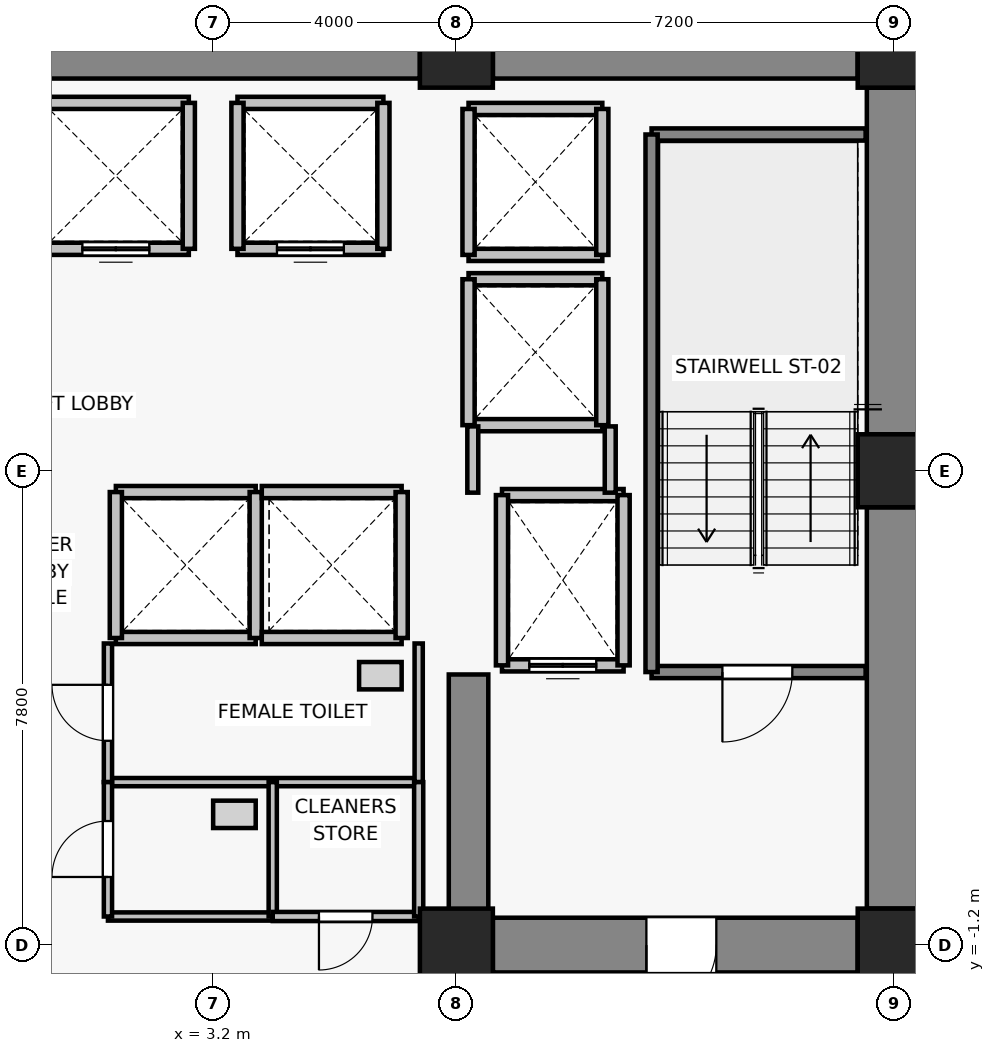
"""IFC4 building model, lengths in metres.
Left out: names, types, materials, properties, quantities, classifications, styles, units other than length and angle.
Written with IfcOpenShell. Run it as: python <this file> out.ifc"""

import sys

from ifc_helpers import new_model, si_unit, direction, frame, frame_2d, origin, origin_2d, place, context, subcontext, project, spatial, rectangle, extrude, source, transform, mapped, element, fill, save


model = new_model("IFC4")
c1 = context("Model", 3, precision=1e-05, world=origin(), true_north=direction((0.0, 1.0)))
c2 = subcontext(c1, "Body", "Model", "MODEL_VIEW")
j1 = project(units=[si_unit("LENGTHUNIT", "METRE"), si_unit("PLANEANGLEUNIT", "RADIAN")], contexts=[c1])
p1 = place(None, origin())
s1 = spatial("IfcSite", under=j1, at=p1, CompositionType="ELEMENT")
p2 = place(p1, origin())
s2 = spatial("IfcBuilding", under=s1, at=p2, CompositionType="ELEMENT")
p3 = place(p2, frame((0.0, 0.0, 37.3)))
s3 = spatial("IfcBuildingStorey", under=s2, at=p3, CompositionType="ELEMENT", Elevation=37.3)
for number, where, z_axis, x_axis in (
    (1, (7.2, -1.2, 0.0), (0.0, 0.0, 1.0), (1.0, 0.0, 0.0)),
    (2, (14.4, -1.2, 0.0), (0.0, 0.0, 1.0), (1.0, 0.0, 0.0)),
    (3, (14.4, 6.6, 0.0), (0.0, 0.0, 1.0), (1.0, 0.0, 0.0)),
    (4, (7.2, 13.5, 0.0), (0.0, 0.0, 1.0), (1.0, 0.0, 0.0)),
    (5, (14.4, 13.5, 0.0), (0.0, 0.0, 1.0), (1.0, 0.0, 0.0)),
):
    element("IfcColumn", number, at=place(p3, frame(where, z_axis=z_axis, x_axis=x_axis)), inside=s3, PredefinedType="COLUMN", context=c2, shape_type="SweptSolid", body=[
        extrude(rectangle(XDim=1.2, YDim=1.2, at=origin_2d()), origin(), (0.0, 0.0, 1.0), 3.3),
    ])
p4 = place(p3, frame((-6.6, 13.5, 0.0), z_axis=(0.0, 0.0, 1.0), x_axis=(1.0, 0.0, 0.0)))
e6 = element("IfcWall", 6, at=p4, inside=s3, PredefinedType="SHEAR", context=c2, shape_type="SweptSolid", body=[
    extrude(rectangle(XDim=13.2, YDim=0.9, at=frame_2d((6.6, 0.0))), origin(), (0.0, 0.0, 1.0), 3.075),
])
p5 = place(p3, frame((7.8, 13.5, 0.0), z_axis=(0.0, 0.0, 1.0), x_axis=(1.0, 0.0, 0.0)))
e7 = element("IfcWall", 7, at=p5, inside=s3, PredefinedType="SHEAR", context=c2, shape_type="SweptSolid", body=[
    extrude(rectangle(XDim=6.0, YDim=0.9, at=frame_2d((3.0, 0.0))), origin(), (0.0, 0.0, 1.0), 3.075),
])
p6 = place(p3, frame((14.4, -0.6, 0.0), z_axis=(0.0, 0.0, 1.0), x_axis=(0.0, 1.0, 0.0)))
e8 = element("IfcWall", 8, at=p6, inside=s3, PredefinedType="SHEAR", context=c2, shape_type="SweptSolid", body=[
    extrude(rectangle(XDim=6.6, YDim=0.9, at=frame_2d((3.3, 0.0))), origin(), (0.0, 0.0, 1.0), 3.075),
])
p7 = place(p3, frame((14.4, 7.2, 0.0), z_axis=(0.0, 0.0, 1.0), x_axis=(0.0, 1.0, 0.0)))
e9 = element("IfcWall", 9, at=p7, inside=s3, PredefinedType="SHEAR", context=c2, shape_type="SweptSolid", body=[
    extrude(rectangle(XDim=5.7, YDim=0.9, at=frame_2d((2.85, 0.0))), origin(), (0.0, 0.0, 1.0), 3.075),
])
p8 = place(p3, frame((13.8, -1.2, 0.0), z_axis=(0.0, 0.0, 1.0), x_axis=(-1.0, 0.0, 0.0)))
e10 = element("IfcWall", 10, at=p8, inside=s3, PredefinedType="SHEAR", context=c2, shape_type="SweptSolid", body=[
    extrude(rectangle(XDim=6.0, YDim=0.9, at=frame_2d((3.0, 0.0))), origin(), (0.0, 0.0, 1.0), 3.075),
])
p9 = place(p8, frame((2.325, 0.0, 0.0)))
e11 = element("IfcOpeningElement", 11, at=p9, cuts=e10, PredefinedType="OPENING", context=c2, shape_type="SweptSolid", body=[
    extrude(rectangle(XDim=1.15, YDim=2.15, at=frame_2d((0.575, 1.075))), frame((0.0, 0.46, 0.0), z_axis=(0.0, -1.0, 0.0), x_axis=(1.0, 0.0, 0.0)), (0.0, 0.0, 1.0), 0.92),
])
p10 = place(p3, frame((7.4, -0.75, 0.0), z_axis=(0.0, 0.0, 1.0), x_axis=(0.0, 1.0, 0.0)))
e12 = element("IfcWall", 12, at=p10, inside=s3, PredefinedType="SHEAR", context=c2, shape_type="SweptSolid", body=[
    extrude(rectangle(XDim=4.0, YDim=0.65, at=frame_2d((2.0, 0.0))), origin(), (0.0, 0.0, 1.0), 3.075),
])
p11 = place(p3, frame((9.95, 3.4, 0.0), z_axis=(0.0, 0.0, 1.0), x_axis=(-1.0, 0.0, 0.0)))
e13 = element("IfcWall", 13, at=p11, inside=s3, PredefinedType="SOLIDWALL", context=c2, shape_type="SweptSolid", body=[
    extrude(rectangle(XDim=2.0, YDim=0.2, at=frame_2d((1.0, 0.0))), origin(), (0.0, 0.0, 1.0), 3.075),
])
p12 = place(p11, frame((0.45, 0.0, 0.0)))
e14 = element("IfcOpeningElement", 14, at=p12, cuts=e13, PredefinedType="OPENING", context=c2, shape_type="SweptSolid", body=[
    extrude(rectangle(XDim=1.1, YDim=2.2, at=frame_2d((0.55, 1.1))), frame((0.0, 0.11, 0.0), z_axis=(0.0, -1.0, 0.0), x_axis=(1.0, 0.0, 0.0)), (0.0, 0.0, 1.0), 0.22),
])
p13 = place(p3, frame((7.95, 6.2, 0.0), z_axis=(0.0, 0.0, 1.0), x_axis=(1.0, 0.0, 0.0)))
e15 = element("IfcWall", 15, at=p13, inside=s3, PredefinedType="SOLIDWALL", context=c2, shape_type="SweptSolid", body=[
    extrude(rectangle(XDim=2.0, YDim=0.2, at=frame_2d((1.0, 0.0))), origin(), (0.0, 0.0, 1.0), 3.075),
])
for number, where, z_axis, x_axis in (
    (16, (7.95, 3.4, 0.0), (0.0, 0.0, 1.0), (0.0, 1.0, 0.0)),
    (17, (9.95, 6.2, 0.0), (0.0, 0.0, 1.0), (0.0, -1.0, 0.0)),
):
    element("IfcWall", number, at=place(p3, frame(where, z_axis=z_axis, x_axis=x_axis)), inside=s3, PredefinedType="SOLIDWALL", context=c2, shape_type="SweptSolid", body=[
        extrude(rectangle(XDim=2.8, YDim=0.2, at=frame_2d((1.4, 0.0))), origin(), (0.0, 0.0, 1.0), 3.075),
    ])
p14 = place(p3, frame((2.8, 10.25, 0.0), z_axis=(0.0, 0.0, 1.0), x_axis=(-1.0, 0.0, 0.0)))
e18 = element("IfcWall", 18, at=p14, inside=s3, PredefinedType="SOLIDWALL", context=c2, shape_type="SweptSolid", body=[
    extrude(rectangle(XDim=2.4, YDim=0.2, at=frame_2d((1.2, 0.0))), origin(), (0.0, 0.0, 1.0), 3.075),
])
p15 = place(p14, frame((0.65, 0.0, 0.0)))
e19 = element("IfcOpeningElement", 19, at=p15, cuts=e18, PredefinedType="OPENING", context=c2, shape_type="SweptSolid", body=[
    extrude(rectangle(XDim=1.1, YDim=2.2, at=frame_2d((0.55, 1.1))), frame((0.0, 0.11, 0.0), z_axis=(0.0, -1.0, 0.0), x_axis=(1.0, 0.0, 0.0)), (0.0, 0.0, 1.0), 0.22),
])
p16 = place(p3, frame((0.4, 12.65, 0.0), z_axis=(0.0, 0.0, 1.0), x_axis=(1.0, 0.0, 0.0)))
e20 = element("IfcWall", 20, at=p16, inside=s3, PredefinedType="SOLIDWALL", context=c2, shape_type="SweptSolid", body=[
    extrude(rectangle(XDim=2.4, YDim=0.2, at=frame_2d((1.2, 0.0))), origin(), (0.0, 0.0, 1.0), 3.075),
])
p17 = place(p3, frame((2.8, 12.65, 0.0), z_axis=(0.0, 0.0, 1.0), x_axis=(0.0, -1.0, 0.0)))
e21 = element("IfcWall", 21, at=p17, inside=s3, PredefinedType="SOLIDWALL", context=c2, shape_type="SweptSolid", body=[
    extrude(rectangle(XDim=2.4, YDim=0.2, at=frame_2d((1.2, 0.0))), origin(), (0.0, 0.0, 1.0), 3.075),
])
p18 = place(p3, frame((6.0, 10.25, 0.0), z_axis=(0.0, 0.0, 1.0), x_axis=(-1.0, 0.0, 0.0)))
e22 = element("IfcWall", 22, at=p18, inside=s3, PredefinedType="SOLIDWALL", context=c2, shape_type="SweptSolid", body=[
    extrude(rectangle(XDim=2.4, YDim=0.2, at=frame_2d((1.2, 0.0))), origin(), (0.0, 0.0, 1.0), 3.075),
])
p19 = place(p18, frame((0.65, 0.0, 0.0)))
e23 = element("IfcOpeningElement", 23, at=p19, cuts=e22, PredefinedType="OPENING", context=c2, shape_type="SweptSolid", body=[
    extrude(rectangle(XDim=1.1, YDim=2.2, at=frame_2d((0.55, 1.1))), frame((0.0, 0.11, 0.0), z_axis=(0.0, -1.0, 0.0), x_axis=(1.0, 0.0, 0.0)), (0.0, 0.0, 1.0), 0.22),
])
for number, where, z_axis, x_axis in (
    (24, (3.6, 12.65, 0.0), (0.0, 0.0, 1.0), (1.0, 0.0, 0.0)),
    (25, (3.6, 10.25, 0.0), (0.0, 0.0, 1.0), (0.0, 1.0, 0.0)),
    (26, (6.0, 12.65, 0.0), (0.0, 0.0, 1.0), (0.0, -1.0, 0.0)),
):
    element("IfcWall", number, at=place(p3, frame(where, z_axis=z_axis, x_axis=x_axis)), inside=s3, PredefinedType="SOLIDWALL", context=c2, shape_type="SweptSolid", body=[
        extrude(rectangle(XDim=2.4, YDim=0.2, at=frame_2d((1.2, 0.0))), origin(), (0.0, 0.0, 1.0), 3.075),
    ])
for number, where, z_axis, x_axis in (
    (27, (3.9, 3.85, 0.0), (0.0, 0.0, 1.0), (-1.0, 0.0, 0.0)),
    (28, (1.6, 6.25, 0.0), (0.0, 0.0, 1.0), (1.0, 0.0, 0.0)),
):
    element("IfcWall", number, at=place(p3, frame(where, z_axis=z_axis, x_axis=x_axis)), inside=s3, PredefinedType="SOLIDWALL", context=c2, shape_type="SweptSolid", body=[
        extrude(rectangle(XDim=2.3, YDim=0.2, at=frame_2d((1.15, 0.0))), origin(), (0.0, 0.0, 1.0), 3.075),
    ])
for number, where, z_axis, x_axis in (
    (29, (1.6, 3.85, 0.0), (0.0, 0.0, 1.0), (0.0, 1.0, 0.0)),
    (30, (3.9, 6.25, 0.0), (0.0, 0.0, 1.0), (0.0, -1.0, 0.0)),
):
    element("IfcWall", number, at=place(p3, frame(where, z_axis=z_axis, x_axis=x_axis)), inside=s3, PredefinedType="SOLIDWALL", context=c2, shape_type="SweptSolid", body=[
        extrude(rectangle(XDim=2.4, YDim=0.2, at=frame_2d((1.2, 0.0))), origin(), (0.0, 0.0, 1.0), 3.075),
    ])
for number, where, z_axis, x_axis in (
    (31, (6.3, 3.85, 0.0), (0.0, 0.0, 1.0), (-1.0, 0.0, 0.0)),
    (32, (4.0, 6.25, 0.0), (0.0, 0.0, 1.0), (1.0, 0.0, 0.0)),
):
    element("IfcWall", number, at=place(p3, frame(where, z_axis=z_axis, x_axis=x_axis)), inside=s3, PredefinedType="SOLIDWALL", context=c2, shape_type="SweptSolid", body=[
        extrude(rectangle(XDim=2.3, YDim=0.2, at=frame_2d((1.15, 0.0))), origin(), (0.0, 0.0, 1.0), 3.075),
    ])
p20 = place(p3, frame((6.3, 6.25, 0.0), z_axis=(0.0, 0.0, 1.0), x_axis=(0.0, -1.0, 0.0)))
e33 = element("IfcWall", 33, at=p20, inside=s3, PredefinedType="SOLIDWALL", context=c2, shape_type="SweptSolid", body=[
    extrude(rectangle(XDim=2.4, YDim=0.2, at=frame_2d((1.2, 0.0))), origin(), (0.0, 0.0, 1.0), 3.075),
])
for number, where, z_axis, x_axis in (
    (34, (9.6, 7.35, 0.0), (0.0, 0.0, 1.0), (-1.0, 0.0, 0.0)),
    (35, (7.4, 9.75, 0.0), (0.0, 0.0, 1.0), (1.0, 0.0, 0.0)),
):
    element("IfcWall", number, at=place(p3, frame(where, z_axis=z_axis, x_axis=x_axis)), inside=s3, PredefinedType="SOLIDWALL", context=c2, shape_type="SweptSolid", body=[
        extrude(rectangle(XDim=2.2, YDim=0.2, at=frame_2d((1.1, 0.0))), origin(), (0.0, 0.0, 1.0), 2.465),
    ])
p21 = place(p3, frame((7.4, 7.35, 0.0), z_axis=(0.0, 0.0, 1.0), x_axis=(0.0, 1.0, 0.0)))
e36 = element("IfcWall", 36, at=p21, inside=s3, PredefinedType="SOLIDWALL", context=c2, shape_type="SweptSolid", body=[
    extrude(rectangle(XDim=2.4, YDim=0.2, at=frame_2d((1.2, 0.0))), origin(), (0.0, 0.0, 1.0), 2.465),
])
p22 = place(p3, frame((9.6, 9.75, 0.0), z_axis=(0.0, 0.0, 1.0), x_axis=(0.0, -1.0, 0.0)))
e37 = element("IfcWall", 37, at=p22, inside=s3, PredefinedType="SOLIDWALL", context=c2, shape_type="SweptSolid", body=[
    extrude(rectangle(XDim=2.4, YDim=0.2, at=frame_2d((1.2, 0.0))), origin(), (0.0, 0.0, 1.0), 3.075),
])
for number, where, z_axis, x_axis in (
    (38, (9.6, 10.15, 0.0), (0.0, 0.0, 1.0), (-1.0, 0.0, 0.0)),
    (39, (7.4, 12.55, 0.0), (0.0, 0.0, 1.0), (1.0, 0.0, 0.0)),
):
    element("IfcWall", number, at=place(p3, frame(where, z_axis=z_axis, x_axis=x_axis)), inside=s3, PredefinedType="SOLIDWALL", context=c2, shape_type="SweptSolid", body=[
        extrude(rectangle(XDim=2.2, YDim=0.2, at=frame_2d((1.1, 0.0))), origin(), (0.0, 0.0, 1.0), 2.465),
    ])
p23 = place(p3, frame((7.4, 10.15, 0.0), z_axis=(0.0, 0.0, 1.0), x_axis=(0.0, 1.0, 0.0)))
e40 = element("IfcWall", 40, at=p23, inside=s3, PredefinedType="SOLIDWALL", context=c2, shape_type="SweptSolid", body=[
    extrude(rectangle(XDim=2.4, YDim=0.2, at=frame_2d((1.2, 0.0))), origin(), (0.0, 0.0, 1.0), 2.465),
])
p24 = place(p3, frame((9.6, 12.55, 0.0), z_axis=(0.0, 0.0, 1.0), x_axis=(0.0, -1.0, 0.0)))
e41 = element("IfcWall", 41, at=p24, inside=s3, PredefinedType="SOLIDWALL", context=c2, shape_type="SweptSolid", body=[
    extrude(rectangle(XDim=2.4, YDim=0.2, at=frame_2d((1.2, 0.0))), origin(), (0.0, 0.0, 1.0), 3.075),
])
p25 = place(p3, frame((13.93, 3.29, 0.0), z_axis=(0.0, 0.0, 1.0), x_axis=(-1.0, 0.0, 0.0)))
e42 = element("IfcWall", 42, at=p25, inside=s3, PredefinedType="SOLIDWALL", context=c2, shape_type="SweptSolid", body=[
    extrude(rectangle(XDim=3.52, YDim=0.2, at=frame_2d((1.76, 0.0))), origin(), (0.0, 0.0, 1.0), 3.075),
])
p26 = place(p25, frame((1.205, 0.0, 0.0)))
e43 = element("IfcOpeningElement", 43, at=p26, cuts=e42, PredefinedType="OPENING", context=c2, shape_type="SweptSolid", body=[
    extrude(rectangle(XDim=1.15, YDim=2.15, at=frame_2d((0.575, 1.075))), frame((0.0, 0.11, 0.0), z_axis=(0.0, -1.0, 0.0), x_axis=(1.0, 0.0, 0.0)), (0.0, 0.0, 1.0), 0.22),
])
p27 = place(p3, frame((10.41, 12.13, 0.0), z_axis=(0.0, 0.0, 1.0), x_axis=(1.0, 0.0, 0.0)))
e44 = element("IfcWall", 44, at=p27, inside=s3, PredefinedType="SOLIDWALL", context=c2, shape_type="SweptSolid", body=[
    extrude(rectangle(XDim=3.52, YDim=0.2, at=frame_2d((1.76, 0.0))), origin(), (0.0, 0.0, 1.0), 3.075),
])
p28 = place(p3, frame((10.41, 3.29, 0.0), z_axis=(0.0, 0.0, 1.0), x_axis=(0.0, 1.0, 0.0)))
e45 = element("IfcWall", 45, at=p28, inside=s3, PredefinedType="SOLIDWALL", context=c2, shape_type="SweptSolid", body=[
    extrude(rectangle(XDim=8.84, YDim=0.2, at=frame_2d((4.42, 0.0))), origin(), (0.0, 0.0, 1.0), 3.075),
])
p29 = place(p3, frame((7.47, 6.24, 0.0), z_axis=(0.0, 0.0, 1.0), x_axis=(0.0, 1.0, 0.0)))
e46 = element("IfcWall", 46, at=p29, inside=s3, PredefinedType="PARTITIONING", context=c2, shape_type="SweptSolid", body=[
    extrude(rectangle(XDim=1.09, YDim=0.18, at=frame_2d((0.545, 0.0))), origin(), (0.0, 0.0, 1.0), 2.465),
])
p30 = place(p3, frame((9.73, 7.33, 0.0), z_axis=(0.0, 0.0, 1.0), x_axis=(0.0, -1.0, 0.0)))
e47 = element("IfcWall", 47, at=p30, inside=s3, PredefinedType="PARTITIONING", context=c2, shape_type="SweptSolid", body=[
    extrude(rectangle(XDim=1.09, YDim=0.18, at=frame_2d((0.545, 0.0))), origin(), (0.0, 0.0, 1.0), 3.075),
])
p31 = place(p3, frame((6.58, 1.48, 0.0), z_axis=(0.0, 0.0, 1.0), x_axis=(-1.0, 0.0, 0.0)))
e48 = element("IfcWall", 48, at=p31, inside=s3, PredefinedType="PARTITIONING", context=c2, shape_type="SweptSolid", body=[
    extrude(rectangle(XDim=5.11, YDim=0.135, at=frame_2d((2.555, 0.0))), origin(), (0.0, 0.0, 1.0), 3.075),
])
p32 = place(p3, frame((1.47, 1.48, 0.0), z_axis=(0.0, 0.0, 1.0), x_axis=(0.0, 1.0, 0.0)))
e49 = element("IfcWall", 49, at=p32, inside=s3, PredefinedType="PARTITIONING", context=c2, shape_type="SweptSolid", body=[
    extrude(rectangle(XDim=2.28, YDim=0.135, at=frame_2d((1.14, 0.0))), origin(), (0.0, 0.0, 1.0), 3.075),
])
p33 = place(p32, frame((0.68, 0.0, 0.0)))
e50 = element("IfcOpeningElement", 50, at=p33, cuts=e49, PredefinedType="OPENING", context=c2, shape_type="SweptSolid", body=[
    extrude(rectangle(XDim=0.92, YDim=2.1, at=frame_2d((0.46, 1.05))), frame((0.0, 0.077, 0.0), z_axis=(0.0, -1.0, 0.0), x_axis=(1.0, 0.0, 0.0)), (0.0, 0.0, 1.0), 0.155),
])
p34 = place(p3, frame((6.58, 3.76, 0.0), z_axis=(0.0, 0.0, 1.0), x_axis=(0.0, -1.0, 0.0)))
e51 = element("IfcWall", 51, at=p34, inside=s3, PredefinedType="PARTITIONING", context=c2, shape_type="SweptSolid", body=[
    extrude(rectangle(XDim=2.28, YDim=0.135, at=frame_2d((1.14, 0.0))), origin(), (0.0, 0.0, 1.0), 3.075),
])
p35 = place(p3, frame((4.18, -0.73, 0.0), z_axis=(0.0, 0.0, 1.0), x_axis=(-1.0, 0.0, 0.0)))
e52 = element("IfcWall", 52, at=p35, inside=s3, PredefinedType="PARTITIONING", context=c2, shape_type="SweptSolid", body=[
    extrude(rectangle(XDim=2.71, YDim=0.135, at=frame_2d((1.355, 0.0))), origin(), (0.0, 0.0, 1.0), 3.075),
])
p36 = place(p3, frame((1.47, -0.73, 0.0), z_axis=(0.0, 0.0, 1.0), x_axis=(0.0, 1.0, 0.0)))
e53 = element("IfcWall", 53, at=p36, inside=s3, PredefinedType="PARTITIONING", context=c2, shape_type="SweptSolid", body=[
    extrude(rectangle(XDim=2.21, YDim=0.135, at=frame_2d((1.105, 0.0))), origin(), (0.0, 0.0, 1.0), 3.075),
])
p37 = place(p36, frame((0.65, 0.0, 0.0)))
e54 = element("IfcOpeningElement", 54, at=p37, cuts=e53, PredefinedType="OPENING", context=c2, shape_type="SweptSolid", body=[
    extrude(rectangle(XDim=0.92, YDim=2.1, at=frame_2d((0.46, 1.05))), frame((0.0, 0.077, 0.0), z_axis=(0.0, -1.0, 0.0), x_axis=(1.0, 0.0, 0.0)), (0.0, 0.0, 1.0), 0.155),
])
p38 = place(p3, frame((4.18, 1.48, 0.0), z_axis=(0.0, 0.0, 1.0), x_axis=(0.0, -1.0, 0.0)))
e55 = element("IfcWall", 55, at=p38, inside=s3, PredefinedType="PARTITIONING", context=c2, shape_type="SweptSolid", body=[
    extrude(rectangle(XDim=2.21, YDim=0.135, at=frame_2d((1.105, 0.0))), origin(), (0.0, 0.0, 1.0), 3.075),
])
p39 = place(p3, frame((6.58, -0.73, 0.0), z_axis=(0.0, 0.0, 1.0), x_axis=(-1.0, 0.0, 0.0)))
e56 = element("IfcWall", 56, at=p39, inside=s3, PredefinedType="PARTITIONING", context=c2, shape_type="SweptSolid", body=[
    extrude(rectangle(XDim=2.4, YDim=0.15, at=frame_2d((1.2, 0.0))), origin(), (0.0, 0.0, 1.0), 3.075),
])
p40 = place(p39, frame((0.76, 0.0, 0.0)))
e57 = element("IfcOpeningElement", 57, at=p40, cuts=e56, PredefinedType="OPENING", context=c2, shape_type="SweptSolid", body=[
    extrude(rectangle(XDim=0.88, YDim=2.1, at=frame_2d((0.44, 1.05))), frame((0.0, 0.085, 0.0), z_axis=(0.0, -1.0, 0.0), x_axis=(1.0, 0.0, 0.0)), (0.0, 0.0, 1.0), 0.17),
])
p41 = place(p3, frame((6.58, 1.48, 0.0), z_axis=(0.0, 0.0, 1.0), x_axis=(0.0, -1.0, 0.0)))
e58 = element("IfcWall", 58, at=p41, inside=s3, PredefinedType="PARTITIONING", context=c2, shape_type="SweptSolid", body=[
    extrude(rectangle(XDim=2.21, YDim=0.15, at=frame_2d((1.105, 0.0))), origin(), (0.0, 0.0, 1.0), 3.075),
])
m1 = source(origin(), c2, "Body", "SweptSolid", [
    extrude(rectangle(XDim=1.1, YDim=2.2, at=frame_2d((0.55, 1.1))), frame((0.0, 0.025, 0.0), z_axis=(0.0, -1.0, 0.0), x_axis=(1.0, 0.0, 0.0)), (0.0, 0.0, 1.0), 0.05),
])
p42 = place(p12, origin())
e59 = element("IfcDoor", 59, at=p42, inside=s3, OperationType="DOUBLE_DOOR_SLIDING", PredefinedType="DOOR", context=c2, shape_type="MappedRepresentation", body=[
    mapped(m1, transform((0.0, 0.0, 0.0), x_axis=(1.0, 0.0, 0.0), y_axis=(0.0, 1.0, 0.0), z_axis=(0.0, 0.0, 1.0), scale=1.0)),
])
fill(e14, e59)
p43 = place(p15, origin())
e60 = element("IfcDoor", 60, at=p43, inside=s3, OperationType="DOUBLE_DOOR_SLIDING", PredefinedType="DOOR", context=c2, shape_type="MappedRepresentation", body=[
    mapped(m1, transform((0.0, 0.0, 0.0), x_axis=(1.0, 0.0, 0.0), y_axis=(0.0, 1.0, 0.0), z_axis=(0.0, 0.0, 1.0), scale=1.0)),
])
fill(e19, e60)
p44 = place(p19, origin())
e61 = element("IfcDoor", 61, at=p44, inside=s3, OperationType="DOUBLE_DOOR_SLIDING", PredefinedType="DOOR", context=c2, shape_type="MappedRepresentation", body=[
    mapped(m1, transform((0.0, 0.0, 0.0), x_axis=(1.0, 0.0, 0.0), y_axis=(0.0, 1.0, 0.0), z_axis=(0.0, 0.0, 1.0), scale=1.0)),
])
fill(e23, e61)
m2 = source(origin(), c2, "Body", "SweptSolid", [
    extrude(rectangle(XDim=1.15, YDim=2.15, at=frame_2d((0.575, 1.075))), frame((0.0, 0.025, 0.0), z_axis=(0.0, -1.0, 0.0), x_axis=(1.0, 0.0, 0.0)), (0.0, 0.0, 1.0), 0.05),
])
p45 = place(p26, origin())
e62 = element("IfcDoor", 62, at=p45, inside=s3, OperationType="SINGLE_SWING_RIGHT", PredefinedType="DOOR", context=c2, shape_type="MappedRepresentation", body=[
    mapped(m2, transform((0.0, 0.0, 0.0), x_axis=(1.0, 0.0, 0.0), y_axis=(0.0, 1.0, 0.0), z_axis=(0.0, 0.0, 1.0), scale=1.0)),
])
fill(e43, e62)
p46 = place(p9, origin())
e63 = element("IfcDoor", 63, at=p46, inside=s3, OperationType="SINGLE_SWING_RIGHT", PredefinedType="DOOR", context=c2, shape_type="MappedRepresentation", body=[
    mapped(m2, transform((0.0, 0.0, 0.0), x_axis=(1.0, 0.0, 0.0), y_axis=(0.0, 1.0, 0.0), z_axis=(0.0, 0.0, 1.0), scale=1.0)),
])
fill(e11, e63)
m3 = source(origin(), c2, "Body", "SweptSolid", [
    extrude(rectangle(XDim=0.92, YDim=2.1, at=frame_2d((0.46, 1.05))), frame((0.0, 0.025, 0.0), z_axis=(0.0, -1.0, 0.0), x_axis=(1.0, 0.0, 0.0)), (0.0, 0.0, 1.0), 0.05),
])
p47 = place(p33, origin())
e64 = element("IfcDoor", 64, at=p47, inside=s3, OperationType="SINGLE_SWING_RIGHT", PredefinedType="DOOR", context=c2, shape_type="MappedRepresentation", body=[
    mapped(m3, transform((0.0, 0.0, 0.0), x_axis=(1.0, 0.0, 0.0), y_axis=(0.0, 1.0, 0.0), z_axis=(0.0, 0.0, 1.0), scale=1.0)),
])
fill(e50, e64)
p48 = place(p37, origin())
e65 = element("IfcDoor", 65, at=p48, inside=s3, OperationType="SINGLE_SWING_LEFT", PredefinedType="DOOR", context=c2, shape_type="MappedRepresentation", body=[
    mapped(m3, transform((0.0, 0.0, 0.0), x_axis=(1.0, 0.0, 0.0), y_axis=(0.0, 1.0, 0.0), z_axis=(0.0, 0.0, 1.0), scale=1.0)),
])
fill(e54, e65)
m4 = source(origin(), c2, "Body", "SweptSolid", [
    extrude(rectangle(XDim=0.88, YDim=2.1, at=frame_2d((0.44, 1.05))), frame((0.0, 0.025, 0.0), z_axis=(0.0, -1.0, 0.0), x_axis=(1.0, 0.0, 0.0)), (0.0, 0.0, 1.0), 0.05),
])
p49 = place(p40, origin())
e66 = element("IfcDoor", 66, at=p49, inside=s3, OperationType="SINGLE_SWING_RIGHT", PredefinedType="DOOR", context=c2, shape_type="MappedRepresentation", body=[
    mapped(m4, transform((0.0, 0.0, 0.0), x_axis=(1.0, 0.0, 0.0), y_axis=(0.0, 1.0, 0.0), z_axis=(0.0, 0.0, 1.0), scale=1.0)),
])
fill(e57, e66)
save(model, sys.argv[1])
